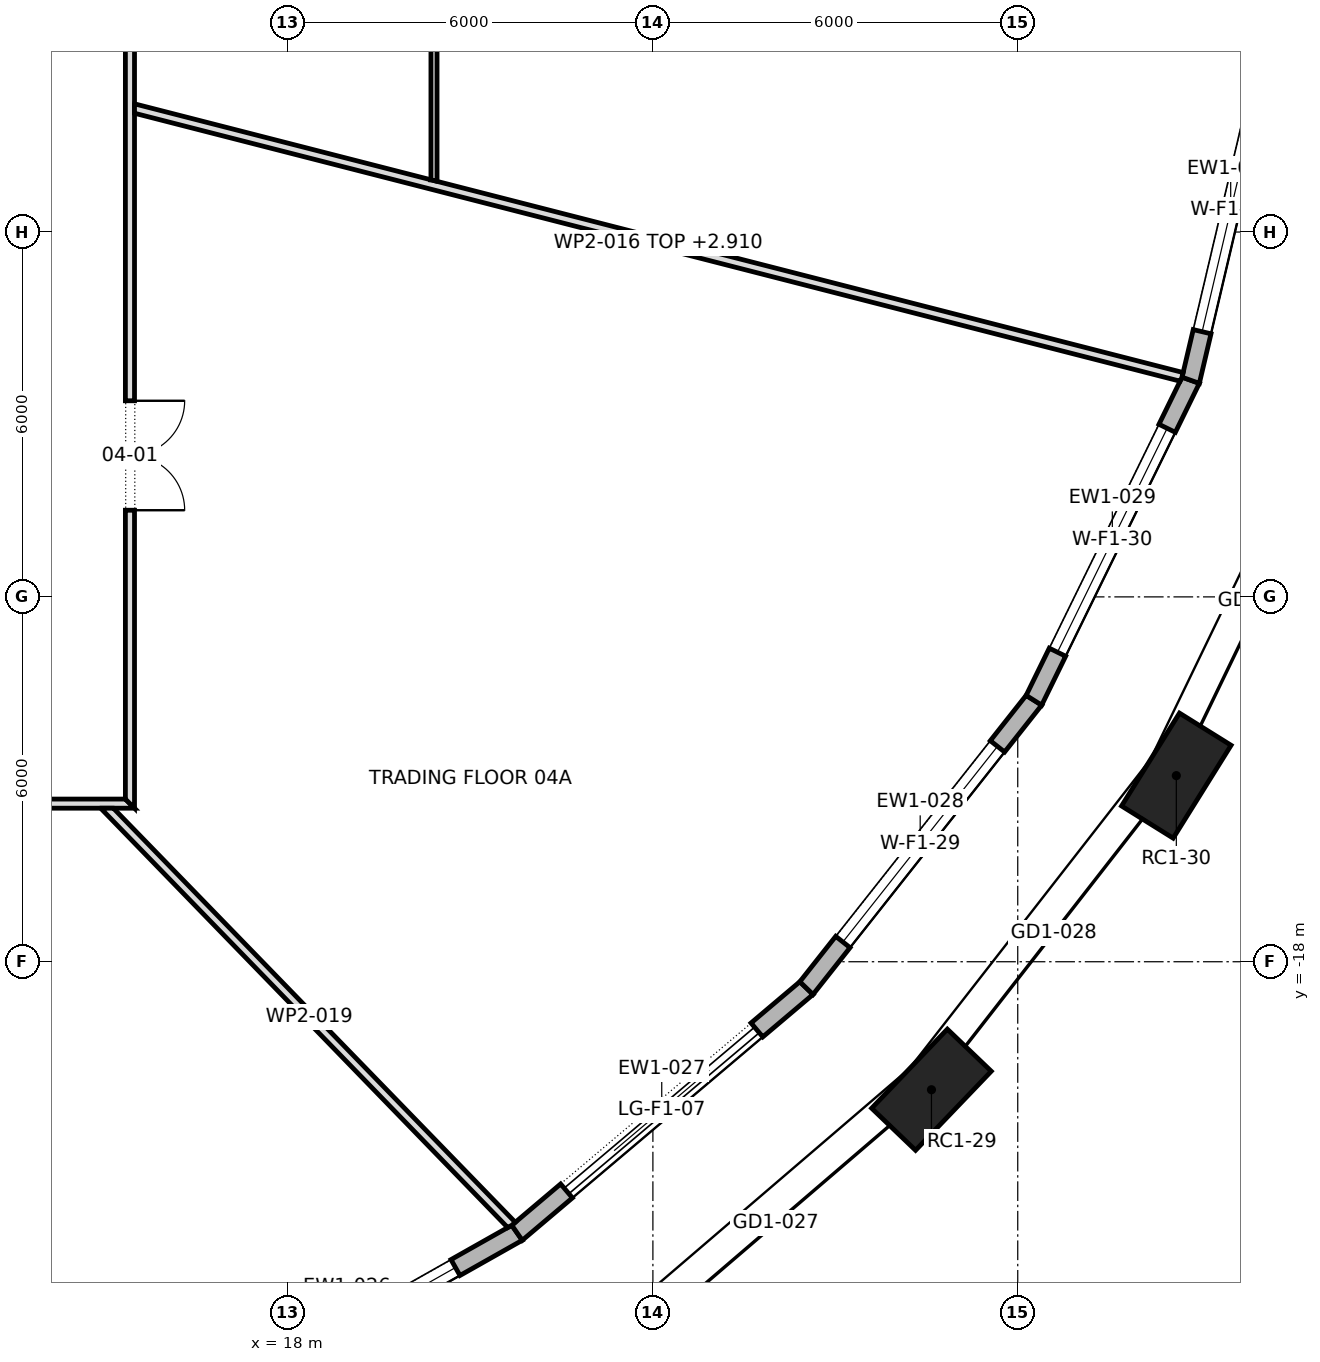
"""IFC4 building model, lengths in metres.
Left out: names, types, materials, properties, quantities, classifications, styles, units other than length and angle.
Written with IfcOpenShell. Run it as: python <this file> out.ifc"""

import sys

from ifc_helpers import new_model, si_unit, direction, frame, frame_2d, origin, origin_2d, place, context, subcontext, project, spatial, polyline, rectangle, outline, extrude, element, fill, save


model = new_model("IFC4")
c1 = context("Model", 3, precision=1e-05, world=origin(), true_north=direction((0.0, 1.0)))
c2 = subcontext(c1, "Body", "Model", "MODEL_VIEW")
j1 = project(units=[si_unit("LENGTHUNIT", "METRE"), si_unit("PLANEANGLEUNIT", "RADIAN")], contexts=[c1])
p1 = place(None, origin())
s1 = spatial("IfcSite", under=j1, at=p1, CompositionType="ELEMENT")
p2 = place(p1, origin())
s2 = spatial("IfcBuilding", under=s1, at=p2, CompositionType="ELEMENT")
p3 = place(p2, frame((0.0, 0.0, 61.3)))
s3 = spatial("IfcBuildingStorey", under=s2, at=p3, CompositionType="ELEMENT", Elevation=61.3)
for number, where, z_axis, x_axis in (
    (1, (28.581, -20.105, 0.0), (0.0, 0.0, 1.0), (0.692, 0.722, 0.0)),
    (2, (32.608, -14.939, 0.0), (0.0, 0.0, 1.0), (0.529, 0.849, 0.0)),
):
    element("IfcColumn", number, at=place(p3, frame(where, z_axis=z_axis, x_axis=x_axis)), inside=s3, PredefinedType="COLUMN", context=c2, shape_type="SweptSolid", body=[
        extrude(rectangle(XDim=1.8, YDim=1.0, at=origin_2d()), origin(), (0.0, 0.0, 1.0), 4.2),
    ])
p4 = place(p3, frame((16.172, -25.617, 0.0), z_axis=(0.0, 0.0, 1.0), x_axis=(0.870673928577, 0.491860661262, 0.0)))
e3 = element("IfcWall", 3, at=p4, inside=s3, PredefinedType="STANDARD", context=c2, shape_type="SweptSolid", body=[
    extrude(outline(polyline([(-0.013, -0.15), (6.439, -0.15), (6.411, 0.15), (0.013, 0.15), (-0.013, -0.15)])), origin(), (0.0, 0.0, 1.0), 3.9),
])
p5 = place(p4, frame((1.163, 0.0, 0.6)))
e4 = element("IfcOpeningElement", 4, at=p5, cuts=e3, PredefinedType="OPENING", context=c2, shape_type="SweptSolid", body=[
    extrude(rectangle(XDim=4.1, YDim=2.85, at=frame_2d((2.05, 1.425))), frame((0.0, 0.162, 0.0), z_axis=(0.0, -1.0, 0.0), x_axis=(1.0, 0.0, 0.0)), (0.0, 0.0, 1.0), 0.324),
])
p6 = place(p3, frame((21.766, -22.457, 0.0), z_axis=(0.0, 0.0, 1.0), x_axis=(0.763655167989, 0.645624336905, 0.0)))
e5 = element("IfcWall", 5, at=p6, inside=s3, PredefinedType="STANDARD", context=c2, shape_type="SweptSolid", body=[
    extrude(outline(polyline([(-0.014, -0.15), (6.247, -0.15), (6.217, 0.15), (0.014, 0.15), (-0.014, -0.15)])), origin(), (0.0, 0.0, 1.0), 3.9),
])
p7 = place(p6, frame((1.066, 0.0, 0.0)))
e6 = element("IfcOpeningElement", 6, at=p7, cuts=e5, PredefinedType="OPENING", context=c2, shape_type="SweptSolid", body=[
    extrude(rectangle(XDim=4.1, YDim=3.45, at=frame_2d((2.05, 1.725))), frame((0.0, 0.162, 0.0), z_axis=(0.0, -1.0, 0.0), x_axis=(1.0, 0.0, 0.0)), (0.0, 0.0, 1.0), 0.324),
])
p8 = place(p3, frame((26.525, -18.434, 0.0), z_axis=(0.0, 0.0, 1.0), x_axis=(0.620065339223, 0.784550173727, 0.0)))
e7 = element("IfcWall", 7, at=p8, inside=s3, PredefinedType="STANDARD", context=c2, shape_type="SweptSolid", body=[
    extrude(outline(polyline([(-0.015, -0.15), (6.05, -0.15), (6.018, 0.15), (0.015, 0.15), (-0.015, -0.15)])), origin(), (0.0, 0.0, 1.0), 3.9),
])
p9 = place(p8, frame((0.967, 0.0, 0.6)))
e8 = element("IfcOpeningElement", 8, at=p9, cuts=e7, PredefinedType="OPENING", context=c2, shape_type="SweptSolid", body=[
    extrude(rectangle(XDim=4.1, YDim=2.85, at=frame_2d((2.05, 1.425))), frame((0.0, 0.162, 0.0), z_axis=(0.0, -1.0, 0.0), x_axis=(1.0, 0.0, 0.0)), (0.0, 0.0, 1.0), 0.324),
])
p10 = place(p3, frame((30.266, -13.7, 0.0), z_axis=(0.0, 0.0, 1.0), x_axis=(0.439949735177, 0.898022399786, 0.0)))
e9 = element("IfcWall", 9, at=p10, inside=s3, PredefinedType="STANDARD", context=c2, shape_type="SweptSolid", body=[
    extrude(outline(polyline([(-0.016, -0.15), (5.877, -0.15), (5.843, 0.15), (0.016, 0.15), (-0.016, -0.15)])), origin(), (0.0, 0.0, 1.0), 3.9),
])
p11 = place(p10, frame((0.88, 0.0, 0.6)))
e10 = element("IfcOpeningElement", 10, at=p11, cuts=e9, PredefinedType="OPENING", context=c2, shape_type="SweptSolid", body=[
    extrude(rectangle(XDim=4.1, YDim=2.85, at=frame_2d((2.05, 1.425))), frame((0.0, 0.162, 0.0), z_axis=(0.0, -1.0, 0.0), x_axis=(1.0, 0.0, 0.0)), (0.0, 0.0, 1.0), 0.324),
])
p12 = place(p3, frame((32.844, -8.438, 0.0), z_axis=(0.0, 0.0, 1.0), x_axis=(0.22905355604, 0.973413821797, 0.0)))
e11 = element("IfcWall", 11, at=p12, inside=s3, PredefinedType="STANDARD", context=c2, shape_type="SweptSolid", body=[
    extrude(outline(polyline([(-0.017, -0.15), (5.758, -0.15), (5.723, 0.15), (0.017, 0.15), (-0.017, -0.15)])), origin(), (0.0, 0.0, 1.0), 3.9),
])
p13 = place(p12, frame((0.82, 0.0, 0.6)))
e12 = element("IfcOpeningElement", 12, at=p13, cuts=e11, PredefinedType="OPENING", context=c2, shape_type="SweptSolid", body=[
    extrude(rectangle(XDim=4.1, YDim=2.85, at=frame_2d((2.05, 1.425))), frame((0.0, 0.162, 0.0), z_axis=(0.0, -1.0, 0.0), x_axis=(1.0, 0.0, 0.0)), (0.0, 0.0, 1.0), 0.324),
])
p14 = place(p3, frame((-15.475, -15.4, 0.0), z_axis=(0.0, 0.0, 1.0), x_axis=(1.0, 0.0, 0.0)))
e13 = element("IfcWall", 13, at=p14, inside=s3, PredefinedType="PARTITIONING", context=c2, shape_type="SweptSolid", body=[
    extrude(outline(polyline([(0.0, -0.075), (1.935, -0.075), (3.869, -0.075), (5.803, -0.075), (7.738, -0.075), (9.672, -0.075), (11.606, -0.075), (13.541, -0.075), (15.475, -0.075), (17.409, -0.075), (19.344, -0.075), (21.278, -0.075), (23.212, -0.075), (25.147, -0.075), (27.081, -0.075), (29.016, -0.075), (30.95, -0.075), (30.8, 0.075), (28.885, 0.075), (26.969, 0.075), (25.053, 0.075), (23.138, 0.075), (21.222, 0.075), (19.306, 0.075), (17.391, 0.075), (15.475, 0.075), (13.56, 0.075), (11.644, 0.075), (9.728, 0.075), (7.812, 0.075), (5.897, 0.075), (3.981, 0.075), (2.066, 0.075), (0.15, 0.075), (0.0, -0.075)])), origin(), (0.0, 0.0, 1.0), 3.9),
])
p15 = place(p14, frame((2.577, 0.0, 0.0)))
e14 = element("IfcOpeningElement", 14, at=p15, cuts=e13, PredefinedType="OPENING", context=c2, shape_type="SweptSolid", body=[
    extrude(rectangle(XDim=1.8, YDim=2.1, at=frame_2d((0.9, 1.05))), frame((0.0, 0.087, 0.0), z_axis=(0.0, -1.0, 0.0), x_axis=(1.0, 0.0, 0.0)), (0.0, 0.0, 1.0), 0.174),
])
p16 = place(p14, frame((9.383, 0.0, 0.0)))
e15 = element("IfcOpeningElement", 15, at=p16, cuts=e13, PredefinedType="OPENING", context=c2, shape_type="SweptSolid", body=[
    extrude(rectangle(XDim=1.8, YDim=2.1, at=frame_2d((0.9, 1.05))), frame((0.0, 0.087, 0.0), z_axis=(0.0, -1.0, 0.0), x_axis=(1.0, 0.0, 0.0)), (0.0, 0.0, 1.0), 0.174),
])
p17 = place(p14, frame((21.155, 0.0, 0.0)))
e16 = element("IfcOpeningElement", 16, at=p17, cuts=e13, PredefinedType="OPENING", context=c2, shape_type="SweptSolid", body=[
    extrude(rectangle(XDim=1.8, YDim=2.1, at=frame_2d((0.9, 1.05))), frame((0.0, 0.087, 0.0), z_axis=(0.0, -1.0, 0.0), x_axis=(1.0, 0.0, 0.0)), (0.0, 0.0, 1.0), 0.174),
])
p18 = place(p3, frame((15.4, -15.475, 0.0), z_axis=(0.0, 0.0, 1.0), x_axis=(0.0, 1.0, 0.0)))
e17 = element("IfcWall", 17, at=p18, inside=s3, PredefinedType="PARTITIONING", context=c2, shape_type="SweptSolid", body=[
    extrude(outline(polyline([(0.0, -0.075), (1.935, -0.075), (3.869, -0.075), (5.803, -0.075), (7.738, -0.075), (9.672, -0.075), (11.606, -0.075), (13.541, -0.075), (15.475, -0.075), (17.409, -0.075), (19.344, -0.075), (21.278, -0.075), (23.212, -0.075), (25.147, -0.075), (27.081, -0.075), (29.016, -0.075), (30.95, -0.075), (30.8, 0.075), (28.885, 0.075), (26.969, 0.075), (25.053, 0.075), (23.138, 0.075), (21.222, 0.075), (19.306, 0.075), (17.391, 0.075), (15.475, 0.075), (13.56, 0.075), (11.644, 0.075), (9.728, 0.075), (7.812, 0.075), (5.897, 0.075), (3.981, 0.075), (2.066, 0.075), (0.15, 0.075), (0.0, -0.075)])), origin(), (0.0, 0.0, 1.0), 3.9),
])
p19 = place(p18, frame((4.9, 0.0, 0.0)))
e18 = element("IfcOpeningElement", 18, at=p19, cuts=e17, PredefinedType="OPENING", context=c2, shape_type="SweptSolid", body=[
    extrude(rectangle(XDim=1.8, YDim=2.1, at=frame_2d((0.9, 1.05))), frame((0.0, 0.087, 0.0), z_axis=(0.0, -1.0, 0.0), x_axis=(1.0, 0.0, 0.0)), (0.0, 0.0, 1.0), 0.174),
])
p20 = place(p18, frame((14.975, 0.0, 0.0)))
e19 = element("IfcOpeningElement", 19, at=p20, cuts=e17, PredefinedType="OPENING", context=c2, shape_type="SweptSolid", body=[
    extrude(rectangle(XDim=1.0, YDim=2.1, at=frame_2d((0.5, 1.05))), frame((0.0, 0.087, 0.0), z_axis=(0.0, -1.0, 0.0), x_axis=(1.0, 0.0, 0.0)), (0.0, 0.0, 1.0), 0.174),
])
p21 = place(p18, frame((24.25, 0.0, 0.0)))
e20 = element("IfcOpeningElement", 20, at=p21, cuts=e17, PredefinedType="OPENING", context=c2, shape_type="SweptSolid", body=[
    extrude(rectangle(XDim=1.8, YDim=2.1, at=frame_2d((0.9, 1.05))), frame((0.0, 0.087, 0.0), z_axis=(0.0, -1.0, 0.0), x_axis=(1.0, 0.0, 0.0)), (0.0, 0.0, 1.0), 0.174),
])
p22 = place(p3, frame((15.457, -3.965, 0.0), z_axis=(0.0, 0.0, 1.0), x_axis=(0.968702688789, -0.248223892349, 0.0)))
e21 = element("IfcWall", 21, at=p22, inside=s3, PredefinedType="PARTITIONING", context=c2, shape_type="SweptSolid", body=[
    extrude(outline(polyline([(0.038, -0.075), (2.01, -0.075), (3.982, -0.075), (5.955, -0.075), (7.927, -0.075), (9.899, -0.075), (11.872, -0.075), (13.844, -0.075), (15.816, -0.075), (17.788, -0.075), (17.801, -0.013), (17.801, 0.075), (15.978, 0.075), (14.155, 0.075), (12.331, 0.075), (10.508, 0.075), (8.685, 0.075), (6.861, 0.075), (5.038, 0.075), (5.032, 0.073), (5.032, 0.075), (3.355, 0.075), (1.677, 0.075), (0.0, 0.075), (0.0, 0.073), (0.038, -0.075)])), origin(), (0.0, 0.0, 1.0), 2.91),
])
p23 = place(p3, frame((20.4, 5.165, 0.0), z_axis=(0.0, 0.0, 1.0), x_axis=(0.0, -1.0, 0.0)))
e22 = element("IfcWall", 22, at=p23, inside=s3, PredefinedType="PARTITIONING", context=c2, shape_type="SweptSolid", body=[
    extrude(outline(polyline([(0.025, -0.05), (1.739, -0.05), (3.452, -0.05), (5.166, -0.05), (6.879, -0.05), (8.593, -0.05), (10.306, -0.05), (10.332, 0.05), (10.332, 0.05), (8.61, 0.05), (6.888, 0.05), (5.166, 0.05), (3.444, 0.05), (1.722, 0.05), (0.0, 0.05), (0.0, 0.049), (0.025, -0.05)])), origin(), (0.0, 0.0, 1.0), 3.9),
])
p24 = place(p23, frame((4.715, 0.0, 0.0)))
e23 = element("IfcOpeningElement", 23, at=p24, cuts=e22, PredefinedType="OPENING", context=c2, shape_type="SweptSolid", body=[
    extrude(rectangle(XDim=0.9, YDim=2.1, at=frame_2d((0.45, 1.05))), frame((0.0, 0.062, 0.0), z_axis=(0.0, -1.0, 0.0), x_axis=(1.0, 0.0, 0.0)), (0.0, 0.0, 1.0), 0.124),
])
p25 = place(p3, frame((21.683, -22.337, 0.0), z_axis=(0.0, 0.0, 1.0), x_axis=(-0.696500320059, 0.71755648151, 0.0)))
e24 = element("IfcWall", 24, at=p25, inside=s3, PredefinedType="PARTITIONING", context=c2, shape_type="SweptSolid", body=[
    extrude(outline(polyline([(0.0, -0.075), (1.898, -0.075), (3.796, -0.075), (5.694, -0.075), (7.592, -0.075), (9.49, -0.075), (9.635, 0.074), (9.635, 0.075), (7.713, 0.075), (5.791, 0.075), (3.869, 0.075), (1.947, 0.075), (0.024, 0.075), (0.005, 0.0), (0.0, -0.072), (0.0, -0.075)])), origin(), (0.0, 0.0, 1.0), 3.9),
])
p26 = place(p5, origin())
e25 = element("IfcWindow", 25, at=p26, inside=s3, PartitioningType="TRIPLE_PANEL_VERTICAL", PredefinedType="WINDOW", context=c2, shape_type="SweptSolid", body=[
    extrude(rectangle(XDim=4.1, YDim=2.85, at=frame_2d((2.05, 1.425))), frame((0.0, 0.03, 0.0), z_axis=(0.0, -1.0, 0.0), x_axis=(1.0, 0.0, 0.0)), (0.0, 0.0, 1.0), 0.06),
])
fill(e4, e25)
p27 = place(p7, origin())
e26 = element("IfcDoor", 26, at=p27, inside=s3, OperationType="DOUBLE_DOOR_SLIDING", PredefinedType="DOOR", context=c2, shape_type="SweptSolid", body=[
    extrude(rectangle(XDim=4.1, YDim=3.45, at=frame_2d((2.05, 1.725))), frame((0.0, 0.025, 0.0), z_axis=(0.0, -1.0, 0.0), x_axis=(1.0, 0.0, 0.0)), (0.0, 0.0, 1.0), 0.05),
])
fill(e6, e26)
p28 = place(p9, origin())
e27 = element("IfcWindow", 27, at=p28, inside=s3, PartitioningType="TRIPLE_PANEL_VERTICAL", PredefinedType="WINDOW", context=c2, shape_type="SweptSolid", body=[
    extrude(rectangle(XDim=4.1, YDim=2.85, at=frame_2d((2.05, 1.425))), frame((0.0, 0.03, 0.0), z_axis=(0.0, -1.0, 0.0), x_axis=(1.0, 0.0, 0.0)), (0.0, 0.0, 1.0), 0.06),
])
fill(e8, e27)
p29 = place(p11, origin())
e28 = element("IfcWindow", 28, at=p29, inside=s3, PartitioningType="TRIPLE_PANEL_VERTICAL", PredefinedType="WINDOW", context=c2, shape_type="SweptSolid", body=[
    extrude(rectangle(XDim=4.1, YDim=2.85, at=frame_2d((2.05, 1.425))), frame((0.0, 0.03, 0.0), z_axis=(0.0, -1.0, 0.0), x_axis=(1.0, 0.0, 0.0)), (0.0, 0.0, 1.0), 0.06),
])
fill(e10, e28)
p30 = place(p13, origin())
e29 = element("IfcWindow", 29, at=p30, inside=s3, PartitioningType="TRIPLE_PANEL_VERTICAL", PredefinedType="WINDOW", context=c2, shape_type="SweptSolid", body=[
    extrude(rectangle(XDim=4.1, YDim=2.85, at=frame_2d((2.05, 1.425))), frame((0.0, 0.03, 0.0), z_axis=(0.0, -1.0, 0.0), x_axis=(1.0, 0.0, 0.0)), (0.0, 0.0, 1.0), 0.06),
])
fill(e12, e29)
p31 = place(p19, frame((1.8, 0.0, 0.0), z_axis=(0.0, 0.0, 1.0), x_axis=(-1.0, 0.0, 0.0)))
e30 = element("IfcDoor", 30, at=p31, inside=s3, OperationType="DOUBLE_DOOR_SINGLE_SWING", PredefinedType="DOOR", context=c2, shape_type="SweptSolid", body=[
    extrude(rectangle(XDim=1.8, YDim=2.1, at=frame_2d((0.9, 1.05))), frame((0.0, 0.025, 0.0), z_axis=(0.0, -1.0, 0.0), x_axis=(1.0, 0.0, 0.0)), (0.0, 0.0, 1.0), 0.05),
])
fill(e18, e30)
save(model, sys.argv[1])
